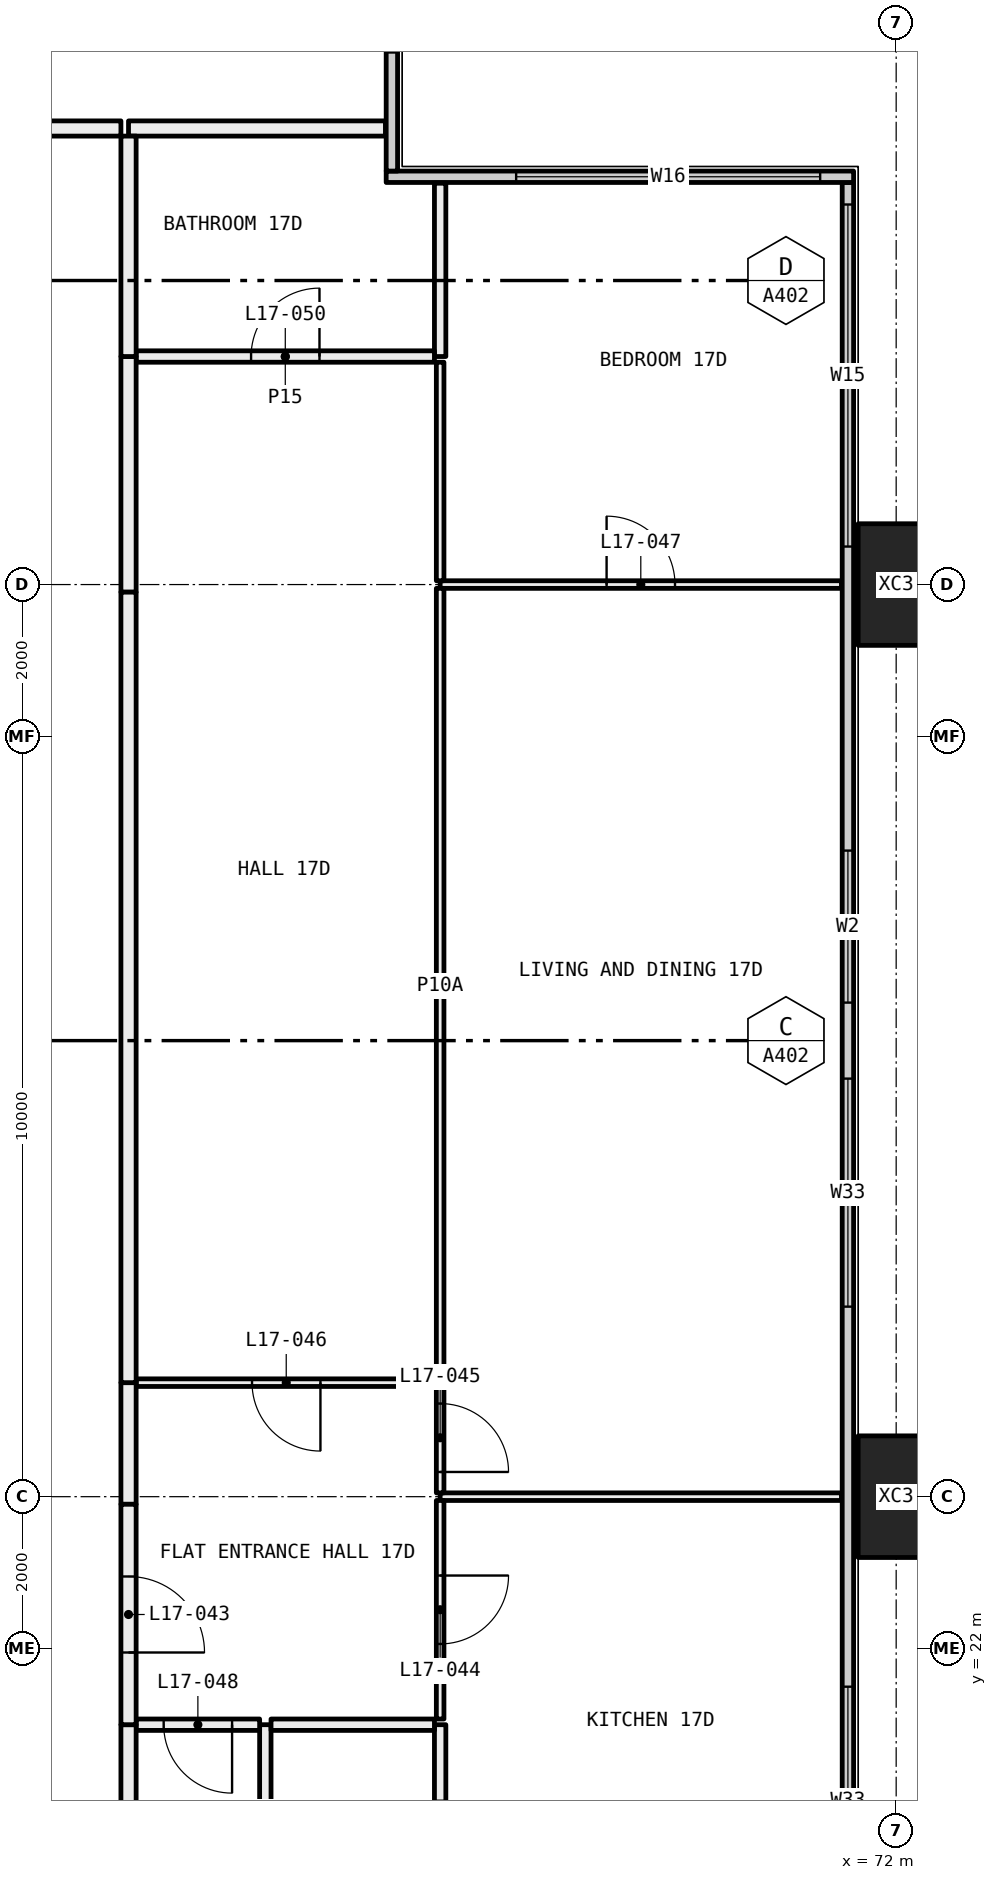
"""IFC4 building model, lengths in metres.
Left out: names, types, materials, properties, quantities, classifications, styles, units other than length and angle.
Written with IfcOpenShell. Run it as: python <this file> out.ifc"""

import sys

from ifc_helpers import new_model, si_unit, direction, frame, frame_2d, origin, origin_2d, place, context, subcontext, project, spatial, rectangle, hollow_rectangle, extrude, element, fill, save


model = new_model("IFC4")
c1 = context("Model", 3, precision=1e-05, world=origin(), true_north=direction((0.0, 1.0)))
c2 = subcontext(c1, "Body", "Model", "MODEL_VIEW")
j1 = project(units=[si_unit("LENGTHUNIT", "METRE"), si_unit("PLANEANGLEUNIT", "RADIAN")], contexts=[c1])
p1 = place(None, origin())
s1 = spatial("IfcSite", under=j1, at=p1, CompositionType="ELEMENT")
p2 = place(p1, origin())
s2 = spatial("IfcBuilding", under=s1, at=p2, CompositionType="ELEMENT")
p3 = place(p2, frame((0.0, 0.0, 71.4)))
s3 = spatial("IfcBuildingStorey", under=s2, at=p3, CompositionType="ELEMENT", Elevation=71.4)
for number, where, z_axis, x_axis in (
    (1, (72.0, 24.0, -0.4), (0.0, 0.0, 1.0), (0.0, 1.0, 0.0)),
    (2, (72.0, 36.0, -0.4), (0.0, 0.0, 1.0), (0.0, 1.0, 0.0)),
):
    element("IfcColumn", number, at=place(p3, frame(where, z_axis=z_axis, x_axis=x_axis)), inside=s3, PredefinedType="COLUMN", context=c2, shape_type="SweptSolid", body=[
        extrude(hollow_rectangle(XDim=1.6, YDim=1.0, WallThickness=0.065, at=origin_2d()), origin(), (0.0, 0.0, 1.0), 3.45),
    ])
p4 = place(p3, frame((71.365, 6.71, 0.0), z_axis=(0.0, 0.0, 1.0), x_axis=(0.0, 1.0, 0.0)))
e3 = element("IfcWall", 3, at=p4, inside=s3, PredefinedType="ELEMENTEDWALL", context=c2, shape_type="SweptSolid", body=[
    extrude(rectangle(XDim=34.58, YDim=0.15, at=frame_2d((17.29, 0.0))), origin(), (0.0, 0.0, 1.0), 3.05),
])
p5 = place(p4, frame((0.29, 0.0, 0.45)))
e4 = element("IfcOpeningElement", 4, at=p5, cuts=e3, PredefinedType="OPENING", context=c2, shape_type="SweptSolid", body=[
    extrude(rectangle(XDim=4.5, YDim=2.55, at=frame_2d((2.25, 1.275))), frame((0.0, 0.085, 0.0), z_axis=(0.0, -1.0, 0.0), x_axis=(1.0, 0.0, 0.0)), (0.0, 0.0, 1.0), 0.17),
])
p6 = place(p4, frame((7.79, 0.0, 0.45)))
e5 = element("IfcOpeningElement", 5, at=p6, cuts=e3, PredefinedType="OPENING", context=c2, shape_type="SweptSolid", body=[
    extrude(rectangle(XDim=3.0, YDim=2.55, at=frame_2d((1.5, 1.275))), frame((0.0, 0.085, 0.0), z_axis=(0.0, -1.0, 0.0), x_axis=(1.0, 0.0, 0.0)), (0.0, 0.0, 1.0), 0.17),
])
p7 = place(p4, frame((11.79, 0.0, 0.45)))
e6 = element("IfcOpeningElement", 6, at=p7, cuts=e3, PredefinedType="OPENING", context=c2, shape_type="SweptSolid", body=[
    extrude(rectangle(XDim=3.0, YDim=2.55, at=frame_2d((1.5, 1.275))), frame((0.0, 0.085, 0.0), z_axis=(0.0, -1.0, 0.0), x_axis=(1.0, 0.0, 0.0)), (0.0, 0.0, 1.0), 0.17),
])
p8 = place(p4, frame((19.79, 0.0, 0.45)))
e7 = element("IfcOpeningElement", 7, at=p8, cuts=e3, PredefinedType="OPENING", context=c2, shape_type="SweptSolid", body=[
    extrude(rectangle(XDim=3.0, YDim=2.55, at=frame_2d((1.5, 1.275))), frame((0.0, 0.085, 0.0), z_axis=(0.0, -1.0, 0.0), x_axis=(1.0, 0.0, 0.0)), (0.0, 0.0, 1.0), 0.17),
])
p9 = place(p4, frame((23.79, 0.0, 0.45)))
e8 = element("IfcOpeningElement", 8, at=p9, cuts=e3, PredefinedType="OPENING", context=c2, shape_type="SweptSolid", body=[
    extrude(rectangle(XDim=2.0, YDim=2.55, at=frame_2d((1.0, 1.275))), frame((0.0, 0.085, 0.0), z_axis=(0.0, -1.0, 0.0), x_axis=(1.0, 0.0, 0.0)), (0.0, 0.0, 1.0), 0.17),
])
p10 = place(p4, frame((29.79, 0.0, 0.45)))
e9 = element("IfcOpeningElement", 9, at=p10, cuts=e3, PredefinedType="OPENING", context=c2, shape_type="SweptSolid", body=[
    extrude(rectangle(XDim=4.5, YDim=2.55, at=frame_2d((2.25, 1.275))), frame((0.0, 0.085, 0.0), z_axis=(0.0, -1.0, 0.0), x_axis=(1.0, 0.0, 0.0)), (0.0, 0.0, 1.0), 0.17),
])
p11 = place(p3, frame((65.29, 41.365, 0.0), z_axis=(0.0, 0.0, 1.0), x_axis=(1.0, 0.0, 0.0)))
e10 = element("IfcWall", 10, at=p11, inside=s3, PredefinedType="ELEMENTEDWALL", context=c2, shape_type="SweptSolid", body=[
    extrude(rectangle(XDim=6.15, YDim=0.15, at=frame_2d((3.075, 0.0))), origin(), (0.0, 0.0, 1.0), 3.05),
])
p12 = place(p11, frame((1.71, 0.0, 0.45)))
e11 = element("IfcOpeningElement", 11, at=p12, cuts=e10, PredefinedType="OPENING", context=c2, shape_type="SweptSolid", body=[
    extrude(rectangle(XDim=4.0, YDim=2.55, at=frame_2d((2.0, 1.275))), frame((0.0, 0.085, 0.0), z_axis=(0.0, -1.0, 0.0), x_axis=(1.0, 0.0, 0.0)), (0.0, 0.0, 1.0), 0.17),
])
p13 = place(p3, frame((65.365, 41.44, 0.0), z_axis=(0.0, 0.0, 1.0), x_axis=(0.0, 1.0, 0.0)))
e12 = element("IfcWall", 12, at=p13, inside=s3, PredefinedType="ELEMENTEDWALL", context=c2, shape_type="SweptSolid", body=[
    extrude(rectangle(XDim=5.85, YDim=0.15, at=frame_2d((2.925, 0.0))), origin(), (0.0, 0.0, 1.0), 3.05),
])
p14 = place(p13, frame((1.56, 0.0, 0.45)))
e13 = element("IfcOpeningElement", 13, at=p14, cuts=e12, PredefinedType="OPENING", context=c2, shape_type="SweptSolid", body=[
    extrude(rectangle(XDim=4.0, YDim=2.55, at=frame_2d((2.0, 1.275))), frame((0.0, 0.085, 0.0), z_axis=(0.0, -1.0, 0.0), x_axis=(1.0, 0.0, 0.0)), (0.0, 0.0, 1.0), 0.17),
])
p15 = place(p3, frame((71.28, 24.0, 0.0), z_axis=(0.0, 0.0, 1.0), x_axis=(-1.0, 0.0, 0.0)))
e14 = element("IfcWall", 14, at=p15, inside=s3, PredefinedType="PARTITIONING", context=c2, shape_type="SweptSolid", body=[
    extrude(rectangle(XDim=5.28, YDim=0.1, at=frame_2d((2.64, 0.0))), origin(), (0.0, 0.0, 1.0), 2.45),
])
p16 = place(p3, frame((66.0, 21.0, 0.0), z_axis=(0.0, 0.0, 1.0), x_axis=(0.0, -1.0, 0.0)))
e15 = element("IfcWall", 15, at=p16, inside=s3, PredefinedType="PARTITIONING", context=c2, shape_type="SweptSolid", body=[
    extrude(rectangle(XDim=2.9, YDim=0.15, at=frame_2d((1.45, 0.0))), origin(), (0.0, 0.0, 1.0), 3.05),
])
p17 = place(p16, frame((1.0, 0.0, 0.0)))
e16 = element("IfcOpeningElement", 16, at=p17, cuts=e15, PredefinedType="OPENING", context=c2, shape_type="SweptSolid", body=[
    extrude(rectangle(XDim=0.9, YDim=2.1, at=frame_2d((0.45, 1.05))), frame((0.0, 0.085, 0.0), z_axis=(0.0, -1.0, 0.0), x_axis=(1.0, 0.0, 0.0)), (0.0, 0.0, 1.0), 0.17),
])
p18 = place(p3, frame((66.0, 23.95, 0.0), z_axis=(0.0, 0.0, 1.0), x_axis=(0.0, -1.0, 0.0)))
e17 = element("IfcWall", 17, at=p18, inside=s3, PredefinedType="PARTITIONING", context=c2, shape_type="SweptSolid", body=[
    extrude(rectangle(XDim=2.875, YDim=0.1, at=frame_2d((1.438, 0.0))), origin(), (0.0, 0.0, 1.0), 2.45),
])
p19 = place(p18, frame((0.988, 0.0, 0.0)))
e18 = element("IfcOpeningElement", 18, at=p19, cuts=e17, PredefinedType="OPENING", context=c2, shape_type="SweptSolid", body=[
    extrude(rectangle(XDim=0.9, YDim=2.1, at=frame_2d((0.45, 1.05))), frame((0.0, 0.06, 0.0), z_axis=(0.0, -1.0, 0.0), x_axis=(1.0, 0.0, 0.0)), (0.0, 0.0, 1.0), 0.12),
])
p20 = place(p3, frame((71.28, 36.0, 0.0), z_axis=(0.0, 0.0, 1.0), x_axis=(-1.0, 0.0, 0.0)))
e19 = element("IfcWall", 19, at=p20, inside=s3, PredefinedType="PARTITIONING", context=c2, shape_type="SweptSolid", body=[
    extrude(rectangle(XDim=5.28, YDim=0.1, at=frame_2d((2.64, 0.0))), origin(), (0.0, 0.0, 1.0), 2.45),
])
p21 = place(p20, frame((2.19, 0.0, 0.0)))
e20 = element("IfcOpeningElement", 20, at=p21, cuts=e19, PredefinedType="OPENING", context=c2, shape_type="SweptSolid", body=[
    extrude(rectangle(XDim=0.9, YDim=2.1, at=frame_2d((0.45, 1.05))), frame((0.0, 0.06, 0.0), z_axis=(0.0, -1.0, 0.0), x_axis=(1.0, 0.0, 0.0)), (0.0, 0.0, 1.0), 0.12),
])
p22 = place(p3, frame((66.0, 25.5, 0.0), z_axis=(0.0, 0.0, 1.0), x_axis=(0.0, -1.0, 0.0)))
e21 = element("IfcWall", 21, at=p22, inside=s3, PredefinedType="PARTITIONING", context=c2, shape_type="SweptSolid", body=[
    extrude(rectangle(XDim=1.45, YDim=0.1, at=frame_2d((0.725, 0.0))), origin(), (0.0, 0.0, 1.0), 2.45),
])
p23 = place(p22, frame((0.275, 0.0, 0.0)))
e22 = element("IfcOpeningElement", 22, at=p23, cuts=e21, PredefinedType="OPENING", context=c2, shape_type="SweptSolid", body=[
    extrude(rectangle(XDim=0.9, YDim=2.1, at=frame_2d((0.45, 1.05))), frame((0.0, 0.06, 0.0), z_axis=(0.0, -1.0, 0.0), x_axis=(1.0, 0.0, 0.0)), (0.0, 0.0, 1.0), 0.12),
])
p24 = place(p3, frame((66.0, 35.95, 0.0), z_axis=(0.0, 0.0, 1.0), x_axis=(0.0, -1.0, 0.0)))
e23 = element("IfcWall", 23, at=p24, inside=s3, PredefinedType="PARTITIONING", context=c2, shape_type="SweptSolid", body=[
    extrude(rectangle(XDim=10.45, YDim=0.1, at=frame_2d((5.225, 0.0))), origin(), (0.0, 0.0, 1.0), 2.45),
])
p25 = place(p3, frame((66.0, 38.925, 0.0), z_axis=(0.0, 0.0, 1.0), x_axis=(0.0, -1.0, 0.0)))
e24 = element("IfcWall", 24, at=p25, inside=s3, PredefinedType="PARTITIONING", context=c2, shape_type="SweptSolid", body=[
    extrude(rectangle(XDim=2.875, YDim=0.1, at=frame_2d((1.438, 0.0))), origin(), (0.0, 0.0, 1.0), 2.45),
])
p26 = place(p3, frame((66.0, 41.28, 0.0), z_axis=(0.0, 0.0, 1.0), x_axis=(0.0, -1.0, 0.0)))
e25 = element("IfcWall", 25, at=p26, inside=s3, PredefinedType="PARTITIONING", context=c2, shape_type="SweptSolid", body=[
    extrude(rectangle(XDim=2.28, YDim=0.15, at=frame_2d((1.14, 0.0))), origin(), (0.0, 0.0, 1.0), 3.05),
])
p27 = place(p3, frame((63.7, 18.1, 0.0), z_axis=(0.0, 0.0, 1.0), x_axis=(0.0, 1.0, 0.0)))
e26 = element("IfcWall", 26, at=p27, inside=s3, PredefinedType="PARTITIONING", context=c2, shape_type="SweptSolid", body=[
    extrude(rectangle(XDim=2.9, YDim=0.15, at=frame_2d((1.45, 0.0))), origin(), (0.0, 0.0, 1.0), 3.05),
])
p28 = place(p3, frame((63.625, 21.0, 0.0), z_axis=(0.0, 0.0, 1.0), x_axis=(-1.0, 0.0, 0.0)))
e27 = element("IfcWall", 27, at=p28, inside=s3, PredefinedType="PARTITIONING", context=c2, shape_type="SweptSolid", body=[
    extrude(rectangle(XDim=1.625, YDim=0.15, at=frame_2d((0.812, 0.0))), origin(), (0.0, 0.0, 1.0), 3.05),
])
p29 = place(p28, frame((0.363, 0.0, 0.0)))
e28 = element("IfcOpeningElement", 28, at=p29, cuts=e27, PredefinedType="OPENING", context=c2, shape_type="SweptSolid", body=[
    extrude(rectangle(XDim=0.9, YDim=2.1, at=frame_2d((0.45, 1.05))), frame((0.0, 0.085, 0.0), z_axis=(0.0, -1.0, 0.0), x_axis=(1.0, 0.0, 0.0)), (0.0, 0.0, 1.0), 0.17),
])
p30 = place(p3, frame((61.9, 21.0, 0.0), z_axis=(0.0, 0.0, 1.0), x_axis=(0.0, -1.0, 0.0)))
e29 = element("IfcWall", 29, at=p30, inside=s3, PredefinedType="PARTITIONING", context=c2, shape_type="SweptSolid", body=[
    extrude(rectangle(XDim=2.9, YDim=0.2, at=frame_2d((1.45, 0.0))), origin(), (0.0, 0.0, 1.0), 3.05),
])
p31 = place(p3, frame((65.925, 21.0, 0.0), z_axis=(0.0, 0.0, 1.0), x_axis=(-1.0, 0.0, 0.0)))
e30 = element("IfcWall", 30, at=p31, inside=s3, PredefinedType="PARTITIONING", context=c2, shape_type="SweptSolid", body=[
    extrude(rectangle(XDim=2.15, YDim=0.15, at=frame_2d((1.075, 0.0))), origin(), (0.0, 0.0, 1.0), 3.05),
])
p32 = place(p3, frame((65.95, 25.5, 0.0), z_axis=(0.0, 0.0, 1.0), x_axis=(-1.0, 0.0, 0.0)))
e31 = element("IfcWall", 31, at=p32, inside=s3, PredefinedType="PARTITIONING", context=c2, shape_type="SweptSolid", body=[
    extrude(rectangle(XDim=3.95, YDim=0.1, at=frame_2d((1.975, 0.0))), origin(), (0.0, 0.0, 1.0), 3.05),
])
p33 = place(p32, frame((1.525, 0.0, 0.0)))
e32 = element("IfcOpeningElement", 32, at=p33, cuts=e31, PredefinedType="OPENING", context=c2, shape_type="SweptSolid", body=[
    extrude(rectangle(XDim=0.9, YDim=2.1, at=frame_2d((0.45, 1.05))), frame((0.0, 0.06, 0.0), z_axis=(0.0, -1.0, 0.0), x_axis=(1.0, 0.0, 0.0)), (0.0, 0.0, 1.0), 0.12),
])
p34 = place(p3, frame((61.9, 25.5, 0.0), z_axis=(0.0, 0.0, 1.0), x_axis=(0.0, -1.0, 0.0)))
e33 = element("IfcWall", 33, at=p34, inside=s3, PredefinedType="PARTITIONING", context=c2, shape_type="SweptSolid", body=[
    extrude(rectangle(XDim=1.6, YDim=0.2, at=frame_2d((0.8, 0.0))), origin(), (0.0, 0.0, 1.0), 2.45),
])
p35 = place(p3, frame((61.9, 23.9, 0.0), z_axis=(0.0, 0.0, 1.0), x_axis=(0.0, -1.0, 0.0)))
e34 = element("IfcWall", 34, at=p35, inside=s3, PredefinedType="PARTITIONING", context=c2, shape_type="SweptSolid", body=[
    extrude(rectangle(XDim=2.9, YDim=0.2, at=frame_2d((1.45, 0.0))), origin(), (0.0, 0.0, 1.0), 3.05),
])
p36 = place(p35, frame((0.95, 0.0, 0.0)))
e35 = element("IfcOpeningElement", 35, at=p36, cuts=e34, PredefinedType="OPENING", context=c2, shape_type="SweptSolid", body=[
    extrude(rectangle(XDim=1.0, YDim=2.1, at=frame_2d((0.5, 1.05))), frame((0.0, 0.11, 0.0), z_axis=(0.0, -1.0, 0.0), x_axis=(1.0, 0.0, 0.0)), (0.0, 0.0, 1.0), 0.22),
])
p37 = place(p3, frame((65.925, 39.0, 0.0), z_axis=(0.0, 0.0, 1.0), x_axis=(-1.0, 0.0, 0.0)))
e36 = element("IfcWall", 36, at=p37, inside=s3, PredefinedType="PARTITIONING", context=c2, shape_type="SweptSolid", body=[
    extrude(rectangle(XDim=3.925, YDim=0.15, at=frame_2d((1.962, 0.0))), origin(), (0.0, 0.0, 1.0), 3.05),
])
p38 = place(p37, frame((1.512, 0.0, 0.0)))
e37 = element("IfcOpeningElement", 37, at=p38, cuts=e36, PredefinedType="OPENING", context=c2, shape_type="SweptSolid", body=[
    extrude(rectangle(XDim=0.9, YDim=2.1, at=frame_2d((0.45, 1.05))), frame((0.0, 0.085, 0.0), z_axis=(0.0, -1.0, 0.0), x_axis=(1.0, 0.0, 0.0)), (0.0, 0.0, 1.0), 0.17),
])
p39 = place(p3, frame((61.9, 39.0, 0.0), z_axis=(0.0, 0.0, 1.0), x_axis=(0.0, -1.0, 0.0)))
e38 = element("IfcWall", 38, at=p39, inside=s3, PredefinedType="PARTITIONING", context=c2, shape_type="SweptSolid", body=[
    extrude(rectangle(XDim=3.1, YDim=0.2, at=frame_2d((1.55, 0.0))), origin(), (0.0, 0.0, 1.0), 2.45),
])
p40 = place(p3, frame((61.9, 35.9, 0.0), z_axis=(0.0, 0.0, 1.0), x_axis=(0.0, -1.0, 0.0)))
e39 = element("IfcWall", 39, at=p40, inside=s3, PredefinedType="PARTITIONING", context=c2, shape_type="SweptSolid", body=[
    extrude(rectangle(XDim=10.4, YDim=0.2, at=frame_2d((5.2, 0.0))), origin(), (0.0, 0.0, 1.0), 3.05),
])
p41 = place(p3, frame((65.28, 42.0, 0.0), z_axis=(0.0, 0.0, 1.0), x_axis=(-1.0, 0.0, 0.0)))
e40 = element("IfcWall", 40, at=p41, inside=s3, PredefinedType="PARTITIONING", context=c2, shape_type="SweptSolid", body=[
    extrude(rectangle(XDim=3.38, YDim=0.2, at=frame_2d((1.69, 0.0))), origin(), (0.0, 0.0, 1.0), 3.05),
])
p42 = place(p3, frame((61.9, 41.9, 0.0), z_axis=(0.0, 0.0, 1.0), x_axis=(0.0, -1.0, 0.0)))
e41 = element("IfcWall", 41, at=p42, inside=s3, PredefinedType="PARTITIONING", context=c2, shape_type="SweptSolid", body=[
    extrude(rectangle(XDim=2.9, YDim=0.2, at=frame_2d((1.45, 0.0))), origin(), (0.0, 0.0, 1.0), 3.05),
])
p43 = place(p3, frame((60.0, 42.0, 0.0), z_axis=(0.0, 0.0, 1.0), x_axis=(1.0, 0.0, 0.0)))
e42 = element("IfcWall", 42, at=p43, inside=s3, PredefinedType="PARTITIONING", context=c2, shape_type="SweptSolid", body=[
    extrude(rectangle(XDim=1.8, YDim=0.2, at=frame_2d((0.9, 0.0))), origin(), (0.0, 0.0, 1.0), 3.05),
])
p44 = place(p7, origin())
e43 = element("IfcWindow", 43, at=p44, inside=s3, PartitioningType="SINGLE_PANEL", PredefinedType="WINDOW", context=c2, shape_type="SweptSolid", body=[
    extrude(rectangle(XDim=3.0, YDim=2.55, at=frame_2d((1.5, 1.275))), frame((0.0, 0.03, 0.0), z_axis=(0.0, -1.0, 0.0), x_axis=(1.0, 0.0, 0.0)), (0.0, 0.0, 1.0), 0.06),
])
fill(e6, e43)
p45 = place(p8, origin())
e44 = element("IfcWindow", 44, at=p45, inside=s3, PartitioningType="SINGLE_PANEL", PredefinedType="WINDOW", context=c2, shape_type="SweptSolid", body=[
    extrude(rectangle(XDim=3.0, YDim=2.55, at=frame_2d((1.5, 1.275))), frame((0.0, 0.03, 0.0), z_axis=(0.0, -1.0, 0.0), x_axis=(1.0, 0.0, 0.0)), (0.0, 0.0, 1.0), 0.06),
])
fill(e7, e44)
p46 = place(p9, origin())
e45 = element("IfcWindow", 45, at=p46, inside=s3, PartitioningType="SINGLE_PANEL", PredefinedType="WINDOW", context=c2, shape_type="SweptSolid", body=[
    extrude(rectangle(XDim=2.0, YDim=2.55, at=frame_2d((1.0, 1.275))), frame((0.0, 0.03, 0.0), z_axis=(0.0, -1.0, 0.0), x_axis=(1.0, 0.0, 0.0)), (0.0, 0.0, 1.0), 0.06),
])
fill(e8, e45)
p47 = place(p10, origin())
e46 = element("IfcWindow", 46, at=p47, inside=s3, PartitioningType="SINGLE_PANEL", PredefinedType="WINDOW", context=c2, shape_type="SweptSolid", body=[
    extrude(rectangle(XDim=4.5, YDim=2.55, at=frame_2d((2.25, 1.275))), frame((0.0, 0.03, 0.0), z_axis=(0.0, -1.0, 0.0), x_axis=(1.0, 0.0, 0.0)), (0.0, 0.0, 1.0), 0.06),
])
fill(e9, e46)
p48 = place(p12, origin())
e47 = element("IfcWindow", 47, at=p48, inside=s3, PartitioningType="SINGLE_PANEL", PredefinedType="WINDOW", context=c2, shape_type="SweptSolid", body=[
    extrude(rectangle(XDim=4.0, YDim=2.55, at=frame_2d((2.0, 1.275))), frame((0.0, 0.03, 0.0), z_axis=(0.0, -1.0, 0.0), x_axis=(1.0, 0.0, 0.0)), (0.0, 0.0, 1.0), 0.06),
])
fill(e11, e47)
p49 = place(p36, origin())
e48 = element("IfcDoor", 48, at=p49, inside=s3, OperationType="SINGLE_SWING_LEFT", PredefinedType="DOOR", context=c2, shape_type="SweptSolid", body=[
    extrude(rectangle(XDim=1.0, YDim=2.1, at=frame_2d((0.5, 1.05))), frame((0.0, 0.025, 0.0), z_axis=(0.0, -1.0, 0.0), x_axis=(1.0, 0.0, 0.0)), (0.0, 0.0, 1.0), 0.05),
])
fill(e35, e48)
p50 = place(p19, origin())
e49 = element("IfcDoor", 49, at=p50, inside=s3, OperationType="SINGLE_SWING_RIGHT", PredefinedType="DOOR", context=c2, shape_type="SweptSolid", body=[
    extrude(rectangle(XDim=0.9, YDim=2.1, at=frame_2d((0.45, 1.05))), frame((0.0, 0.025, 0.0), z_axis=(0.0, -1.0, 0.0), x_axis=(1.0, 0.0, 0.0)), (0.0, 0.0, 1.0), 0.05),
])
fill(e18, e49)
p51 = place(p23, origin())
e50 = element("IfcDoor", 50, at=p51, inside=s3, OperationType="SINGLE_SWING_LEFT", PredefinedType="DOOR", context=c2, shape_type="SweptSolid", body=[
    extrude(rectangle(XDim=0.9, YDim=2.1, at=frame_2d((0.45, 1.05))), frame((0.0, 0.025, 0.0), z_axis=(0.0, -1.0, 0.0), x_axis=(1.0, 0.0, 0.0)), (0.0, 0.0, 1.0), 0.05),
])
fill(e22, e50)
p52 = place(p33, origin())
e51 = element("IfcDoor", 51, at=p52, inside=s3, OperationType="SINGLE_SWING_RIGHT", PredefinedType="DOOR", context=c2, shape_type="SweptSolid", body=[
    extrude(rectangle(XDim=0.9, YDim=2.1, at=frame_2d((0.45, 1.05))), frame((0.0, 0.025, 0.0), z_axis=(0.0, -1.0, 0.0), x_axis=(1.0, 0.0, 0.0)), (0.0, 0.0, 1.0), 0.05),
])
fill(e32, e51)
p53 = place(p21, frame((0.9, 0.0, 0.0), x_axis=(-1.0, 0.0, 0.0)))
e52 = element("IfcDoor", 52, at=p53, inside=s3, OperationType="SINGLE_SWING_RIGHT", PredefinedType="DOOR", context=c2, shape_type="SweptSolid", body=[
    extrude(rectangle(XDim=0.9, YDim=2.1, at=frame_2d((0.45, 1.05))), frame((0.0, 0.025, 0.0), z_axis=(0.0, -1.0, 0.0), x_axis=(1.0, 0.0, 0.0)), (0.0, 0.0, 1.0), 0.05),
])
fill(e20, e52)
p54 = place(p29, origin())
e53 = element("IfcDoor", 53, at=p54, inside=s3, OperationType="SINGLE_SWING_RIGHT", PredefinedType="DOOR", context=c2, shape_type="SweptSolid", body=[
    extrude(rectangle(XDim=0.9, YDim=2.1, at=frame_2d((0.45, 1.05))), frame((0.0, 0.025, 0.0), z_axis=(0.0, -1.0, 0.0), x_axis=(1.0, 0.0, 0.0)), (0.0, 0.0, 1.0), 0.05),
])
fill(e28, e53)
p55 = place(p38, frame((0.9, 0.0, 0.0), x_axis=(-1.0, 0.0, 0.0)))
e54 = element("IfcDoor", 54, at=p55, inside=s3, OperationType="SINGLE_SWING_LEFT", PredefinedType="DOOR", context=c2, shape_type="SweptSolid", body=[
    extrude(rectangle(XDim=0.9, YDim=2.1, at=frame_2d((0.45, 1.05))), frame((0.0, 0.025, 0.0), z_axis=(0.0, -1.0, 0.0), x_axis=(1.0, 0.0, 0.0)), (0.0, 0.0, 1.0), 0.05),
])
fill(e37, e54)
save(model, sys.argv[1])
